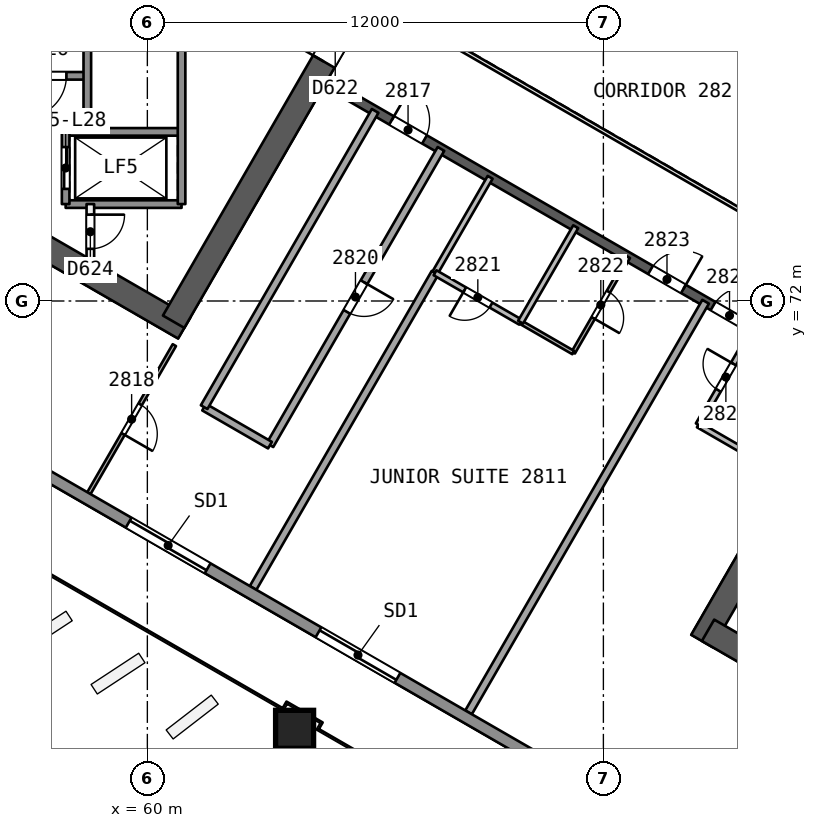
"""IFC4 building model, lengths in metres.
Left out: names, types, materials, properties, quantities, classifications, styles, units other than length and angle.
Written with IfcOpenShell. Run it as: python <this file> out.ifc"""

import sys

from ifc_helpers import new_model, si_unit, direction, frame, frame_2d, origin, origin_2d, place, context, subcontext, project, spatial, rectangle, extrude, element, fill, save


model = new_model("IFC4")
c1 = context("Model", 3, precision=1e-05, world=origin(), true_north=direction((0.0, 1.0)))
c2 = subcontext(c1, "Body", "Model", "MODEL_VIEW")
j1 = project(units=[si_unit("LENGTHUNIT", "METRE"), si_unit("PLANEANGLEUNIT", "RADIAN")], contexts=[c1])
p1 = place(None, origin())
s1 = spatial("IfcSite", under=j1, at=p1, CompositionType="ELEMENT")
p2 = place(p1, origin())
s2 = spatial("IfcBuilding", under=s1, at=p2, CompositionType="ELEMENT")
p3 = place(p2, frame((0.0, 0.0, 117.9)))
s3 = spatial("IfcBuildingStorey", under=s2, at=p3, CompositionType="ELEMENT", Elevation=117.9)
p4 = place(p3, frame((48.722, 78.365, 0.0), z_axis=(0.0, 0.0, 1.0), x_axis=(0.866020036431, -0.500009296414, 0.0)))
e1 = element("IfcWall", 1, at=p4, inside=s3, PredefinedType="SHEAR", context=c2, shape_type="SweptSolid", body=[
    extrude(rectangle(XDim=14.146, YDim=0.65, at=frame_2d((7.073, 0.0))), origin(), (0.0, 0.0, 1.0), 3.7),
])
p5 = place(p3, frame((60.691, 71.455, 0.0), z_axis=(0.0, 0.0, 1.0), x_axis=(0.499983075189, 0.866035175108, 0.0)))
e2 = element("IfcWall", 2, at=p5, inside=s3, PredefinedType="SHEAR", context=c2, shape_type="SweptSolid", body=[
    extrude(rectangle(XDim=10.055, YDim=0.65, at=frame_2d((5.027, 0.0))), origin(), (0.0, 0.0, 1.0), 3.7),
])
p6 = place(p5, frame((7.905, 0.0, 0.0)))
e3 = element("IfcOpeningElement", 3, at=p6, cuts=e2, PredefinedType="OPENING", context=c2, shape_type="SweptSolid", body=[
    extrude(rectangle(XDim=1.2, YDim=2.1, at=frame_2d((0.6, 1.05))), frame((0.0, 0.335, 0.0), z_axis=(0.0, -1.0, 0.0), x_axis=(1.0, 0.0, 0.0)), (0.0, 0.0, 1.0), 0.671),
])
p7 = place(p3, frame((79.688, 71.881, 0.0), z_axis=(0.0, 0.0, 1.0), x_axis=(-0.49999822179, -0.866026430432, 0.0)))
e4 = element("IfcWall", 4, at=p7, inside=s3, PredefinedType="SHEAR", context=c2, shape_type="SweptSolid", body=[
    extrude(rectangle(XDim=10.192, YDim=0.65, at=frame_2d((5.096, 0.0))), origin(), (0.0, 0.0, 1.0), 3.7),
])
p8 = place(p7, frame((0.762, 0.0, 0.0)))
e5 = element("IfcOpeningElement", 5, at=p8, cuts=e4, PredefinedType="OPENING", context=c2, shape_type="SweptSolid", body=[
    extrude(rectangle(XDim=1.2, YDim=2.1, at=frame_2d((0.6, 1.05))), frame((0.0, 0.335, 0.0), z_axis=(0.0, -1.0, 0.0), x_axis=(1.0, 0.0, 0.0)), (0.0, 0.0, 1.0), 0.671),
])
p9 = place(p3, frame((74.754, 63.335, 0.0), z_axis=(0.0, 0.0, 1.0), x_axis=(0.866026250715, -0.49999853307, 0.0)))
e6 = element("IfcWall", 6, at=p9, inside=s3, PredefinedType="SHEAR", context=c2, shape_type="SweptSolid", body=[
    extrude(rectangle(XDim=14.008, YDim=0.65, at=frame_2d((7.004, 0.0))), origin(), (0.0, 0.0, 1.0), 3.7),
])
p10 = place(p3, frame((64.7, 77.748, 0.0), z_axis=(0.0, 0.0, 1.0), x_axis=(0.866026492143, -0.499998114903, 0.0)))
e7 = element("IfcWall", 7, at=p10, inside=s3, PredefinedType="SHEAR", context=c2, shape_type="SweptSolid", body=[
    extrude(rectangle(XDim=15.588, YDim=0.25, at=frame_2d((7.794, 0.0))), origin(), (0.0, 0.0, 1.0), 3.25),
])
p11 = place(p10, frame((1.994, 0.0, 0.0)))
e8 = element("IfcOpeningElement", 8, at=p11, cuts=e7, PredefinedType="OPENING", context=c2, shape_type="SweptSolid", body=[
    extrude(rectangle(XDim=1.0, YDim=2.1, at=frame_2d((0.5, 1.05))), frame((0.0, 0.135, 0.0), z_axis=(0.0, -1.0, 0.0), x_axis=(1.0, 0.0, 0.0)), (0.0, 0.0, 1.0), 0.271),
])
p12 = place(p10, frame((9.862, 0.0, 0.0)))
e9 = element("IfcOpeningElement", 9, at=p12, cuts=e7, PredefinedType="OPENING", context=c2, shape_type="SweptSolid", body=[
    extrude(rectangle(XDim=1.0, YDim=2.1, at=frame_2d((0.5, 1.05))), frame((0.0, 0.135, 0.0), z_axis=(0.0, -1.0, 0.0), x_axis=(1.0, 0.0, 0.0)), (0.0, 0.0, 1.0), 0.271),
])
p13 = place(p10, frame((11.762, 0.0, 0.0)))
e10 = element("IfcOpeningElement", 10, at=p13, cuts=e7, PredefinedType="OPENING", context=c2, shape_type="SweptSolid", body=[
    extrude(rectangle(XDim=1.0, YDim=2.1, at=frame_2d((0.5, 1.05))), frame((0.0, 0.135, 0.0), z_axis=(0.0, -1.0, 0.0), x_axis=(1.0, 0.0, 0.0)), (0.0, 0.0, 1.0), 0.271),
])
p14 = place(p3, frame((63.862, 60.709, 0.0), z_axis=(0.010092954999, 0.017481261926, 0.999796248113), x_axis=(-0.866025993948, 0.499998977805, 1.48321e-07)))
e11 = element("IfcColumn", 11, at=p14, inside=s3, PredefinedType="COLUMN", context=c2, shape_type="SweptSolid", body=[
    extrude(rectangle(XDim=1.0, YDim=1.0, at=origin_2d()), origin(), (0.0, 0.0, 1.0), 3.701),
])
p15 = place(p3, frame((60.71, 70.838, 0.0), z_axis=(0.0, 0.0, 1.0), x_axis=(-0.499957405522, -0.866049994321, 0.0)))
e12 = element("IfcWall", 12, at=p15, inside=s3, PredefinedType="PARTITIONING", context=c2, shape_type="SweptSolid", body=[
    extrude(rectangle(XDim=4.498, YDim=0.1, at=frame_2d((2.249, 0.0))), origin(), (0.0, 0.0, 1.0), 3.25),
])
p16 = place(p15, frame((1.799, 0.0, 0.0)))
e13 = element("IfcOpeningElement", 13, at=p16, cuts=e12, PredefinedType="OPENING", context=c2, shape_type="SweptSolid", body=[
    extrude(rectangle(XDim=0.9, YDim=2.1, at=frame_2d((0.45, 1.05))), frame((0.0, 0.061, 0.0), z_axis=(0.0, -1.0, 0.0), x_axis=(1.0, 0.0, 0.0)), (0.0, 0.0, 1.0), 0.121),
])
p17 = place(p3, frame((67.726, 76.001, 0.0), z_axis=(0.0, 0.0, 1.0), x_axis=(-0.5000018851, -0.866024315419, 0.0)))
e14 = element("IfcWall", 14, at=p17, inside=s3, PredefinedType="PARTITIONING", context=c2, shape_type="SweptSolid", body=[
    extrude(rectangle(XDim=9.0, YDim=0.2, at=frame_2d((4.5, 0.0))), origin(), (0.0, 0.0, 1.0), 3.25),
])
p18 = place(p17, frame((4.05, 0.0, 0.0)))
e15 = element("IfcOpeningElement", 15, at=p18, cuts=e14, PredefinedType="OPENING", context=c2, shape_type="SweptSolid", body=[
    extrude(rectangle(XDim=0.9, YDim=2.1, at=frame_2d((0.45, 1.05))), frame((0.0, 0.11, 0.0), z_axis=(0.0, -1.0, 0.0), x_axis=(1.0, 0.0, 0.0)), (0.0, 0.0, 1.0), 0.221),
])
p19 = place(p3, frame((63.226, 68.207, 0.0), z_axis=(0.0, 0.0, 1.0), x_axis=(-0.866041268327, 0.499972520799, 0.0)))
e16 = element("IfcWall", 16, at=p19, inside=s3, PredefinedType="PARTITIONING", context=c2, shape_type="SweptSolid", body=[
    extrude(rectangle(XDim=2.0, YDim=0.2, at=frame_2d((1.0, 0.0))), origin(), (0.0, 0.0, 1.0), 3.25),
])
p20 = place(p3, frame((61.494, 69.207, 0.0), z_axis=(0.0, 0.0, 1.0), x_axis=(0.5000018851, 0.866024315419, 0.0)))
e17 = element("IfcWall", 17, at=p20, inside=s3, PredefinedType="PARTITIONING", context=c2, shape_type="SweptSolid", body=[
    extrude(rectangle(XDim=9.0, YDim=0.2, at=frame_2d((4.5, 0.0))), origin(), (0.0, 0.0, 1.0), 3.25),
])
p21 = place(p3, frame((62.782, 64.449, 0.0), z_axis=(0.0, 0.0, 1.0), x_axis=(0.500007865211, 0.866020862755, 0.0)))
e18 = element("IfcWall", 18, at=p21, inside=s3, PredefinedType="PARTITIONING", context=c2, shape_type="SweptSolid", body=[
    extrude(rectangle(XDim=9.576, YDim=0.2, at=frame_2d((4.788, 0.0))), origin(), (0.0, 0.0, 1.0), 3.25),
])
p22 = place(p3, frame((67.57, 72.743, 0.0), z_axis=(0.0, 0.0, 1.0), x_axis=(0.499987231761, 0.866032775405, 0.0)))
e19 = element("IfcWall", 19, at=p22, inside=s3, PredefinedType="PARTITIONING", context=c2, shape_type="SweptSolid", body=[
    extrude(rectangle(XDim=2.9, YDim=0.15, at=frame_2d((1.45, 0.0))), origin(), (0.0, 0.0, 1.0), 3.25),
])
p23 = place(p3, frame((69.822, 71.443, 0.0), z_axis=(0.0, 0.0, 1.0), x_axis=(-0.866021400173, 0.500006934395, 0.0)))
e20 = element("IfcWall", 20, at=p23, inside=s3, PredefinedType="PARTITIONING", context=c2, shape_type="SweptSolid", body=[
    extrude(rectangle(XDim=2.6, YDim=0.15, at=frame_2d((1.3, 0.0))), origin(), (0.0, 0.0, 1.0), 3.25),
])
p24 = place(p23, frame((0.9, 0.0, 0.0)))
e21 = element("IfcOpeningElement", 21, at=p24, cuts=e20, PredefinedType="OPENING", context=c2, shape_type="SweptSolid", body=[
    extrude(rectangle(XDim=0.8, YDim=2.1, at=frame_2d((0.4, 1.05))), frame((0.0, 0.085, 0.0), z_axis=(0.0, -1.0, 0.0), x_axis=(1.0, 0.0, 0.0)), (0.0, 0.0, 1.0), 0.171),
])
p25 = place(p3, frame((72.657, 73.154, 0.0), z_axis=(0.0, 0.0, 1.0), x_axis=(-0.499987231761, -0.866032775405, 0.0)))
e22 = element("IfcWall", 22, at=p25, inside=s3, PredefinedType="PARTITIONING", context=c2, shape_type="SweptSolid", body=[
    extrude(rectangle(XDim=2.9, YDim=0.1, at=frame_2d((1.45, 0.0))), origin(), (0.0, 0.0, 1.0), 3.25),
])
p26 = place(p25, frame((1.05, 0.0, 0.0)))
e23 = element("IfcOpeningElement", 23, at=p26, cuts=e22, PredefinedType="OPENING", context=c2, shape_type="SweptSolid", body=[
    extrude(rectangle(XDim=0.8, YDim=2.1, at=frame_2d((0.4, 1.05))), frame((0.0, 0.061, 0.0), z_axis=(0.0, -1.0, 0.0), x_axis=(1.0, 0.0, 0.0)), (0.0, 0.0, 1.0), 0.121),
])
p27 = place(p3, frame((71.207, 70.643, 0.0), z_axis=(0.0, 0.0, 1.0), x_axis=(-0.866055983265, 0.499947031044, 0.0)))
e24 = element("IfcWall", 24, at=p27, inside=s3, PredefinedType="PARTITIONING", context=c2, shape_type="SweptSolid", body=[
    extrude(rectangle(XDim=1.6, YDim=0.1, at=frame_2d((0.8, 0.0))), origin(), (0.0, 0.0, 1.0), 3.25),
])
p28 = place(p3, frame((68.452, 61.176, 0.0), z_axis=(0.0, 0.0, 1.0), x_axis=(0.499988393093, 0.866032104932, 0.0)))
e25 = element("IfcWall", 25, at=p28, inside=s3, PredefinedType="PARTITIONING", context=c2, shape_type="SweptSolid", body=[
    extrude(rectangle(XDim=12.476, YDim=0.2, at=frame_2d((6.238, 0.0))), origin(), (0.0, 0.0, 1.0), 3.25),
])
p29 = place(p3, frame((69.822, 71.443, 0.0), z_axis=(0.0, 0.0, 1.0), x_axis=(0.499987231761, 0.866032775405, 0.0)))
e26 = element("IfcWall", 26, at=p29, inside=s3, PredefinedType="PARTITIONING", context=c2, shape_type="SweptSolid", body=[
    extrude(rectangle(XDim=2.9, YDim=0.15, at=frame_2d((1.45, 0.0))), origin(), (0.0, 0.0, 1.0), 3.25),
])
p30 = place(p3, frame((76.578, 67.542, 0.0), z_axis=(0.0, 0.0, 1.0), x_axis=(-0.866038271014, 0.499977712642, 0.0)))
e27 = element("IfcWall", 27, at=p30, inside=s3, PredefinedType="PARTITIONING", context=c2, shape_type="SweptSolid", body=[
    extrude(rectangle(XDim=2.401, YDim=0.15, at=frame_2d((1.2, 0.0))), origin(), (0.0, 0.0, 1.0), 3.25),
])
p31 = place(p3, frame((74.498, 68.743, 0.0), z_axis=(0.0, 0.0, 1.0), x_axis=(0.499987231761, 0.866032775405, 0.0)))
e28 = element("IfcWall", 28, at=p31, inside=s3, PredefinedType="PARTITIONING", context=c2, shape_type="SweptSolid", body=[
    extrude(rectangle(XDim=2.9, YDim=0.15, at=frame_2d((1.45, 0.0))), origin(), (0.0, 0.0, 1.0), 3.25),
])
p32 = place(p31, frame((1.05, 0.0, 0.0)))
e29 = element("IfcOpeningElement", 29, at=p32, cuts=e28, PredefinedType="OPENING", context=c2, shape_type="SweptSolid", body=[
    extrude(rectangle(XDim=0.8, YDim=2.1, at=frame_2d((0.4, 1.05))), frame((0.0, 0.085, 0.0), z_axis=(0.0, -1.0, 0.0), x_axis=(1.0, 0.0, 0.0)), (0.0, 0.0, 1.0), 0.171),
])
p33 = place(p3, frame((89.699, 48.737, 0.0), z_axis=(0.0, 0.0, 1.0), x_axis=(-0.866023671094, 0.500003001095, 0.0)))
e30 = element("IfcWall", 30, at=p33, inside=s3, PredefinedType="SOLIDWALL", context=c2, shape_type="SweptSolid", body=[
    extrude(rectangle(XDim=56.723, YDim=0.3, at=frame_2d((28.361, 0.0))), origin(), (0.0, 0.0, 1.0), 3.25),
])
p34 = place(p33, frame((32.461, 0.0, 0.0)))
e31 = element("IfcOpeningElement", 31, at=p34, cuts=e30, PredefinedType="OPENING", context=c2, shape_type="SweptSolid", body=[
    extrude(rectangle(XDim=2.4, YDim=2.4, at=frame_2d((1.2, 1.2))), frame((0.0, 0.161, 0.0), z_axis=(0.0, -1.0, 0.0), x_axis=(1.0, 0.0, 0.0)), (0.0, 0.0, 1.0), 0.321),
])
p35 = place(p33, frame((44.039, 0.0, 0.0)))
e32 = element("IfcOpeningElement", 32, at=p35, cuts=e30, PredefinedType="OPENING", context=c2, shape_type="SweptSolid", body=[
    extrude(rectangle(XDim=2.4, YDim=2.4, at=frame_2d((1.2, 1.2))), frame((0.0, 0.161, 0.0), z_axis=(0.0, -1.0, 0.0), x_axis=(1.0, 0.0, 0.0)), (0.0, 0.0, 1.0), 0.321),
])
p36 = place(p33, frame((11.067, 0.0, 0.0)))
e33 = element("IfcOpeningElement", 33, at=p36, cuts=e30, PredefinedType="OPENING", context=c2, shape_type="SweptSolid", body=[
    extrude(rectangle(XDim=2.4, YDim=2.4, at=frame_2d((1.2, 1.2))), frame((0.0, 0.161, 0.0), z_axis=(0.0, -1.0, 0.0), x_axis=(1.0, 0.0, 0.0)), (0.0, 0.0, 1.0), 0.321),
])
p37 = place(p33, frame((26.694, 0.0, 0.0)))
e34 = element("IfcOpeningElement", 34, at=p37, cuts=e30, PredefinedType="OPENING", context=c2, shape_type="SweptSolid", body=[
    extrude(rectangle(XDim=2.4, YDim=2.4, at=frame_2d((1.2, 1.2))), frame((0.0, 0.161, 0.0), z_axis=(0.0, -1.0, 0.0), x_axis=(1.0, 0.0, 0.0)), (0.0, 0.0, 1.0), 0.321),
])
p38 = place(p3, frame((58.42, 77.925, 0.0), z_axis=(0.0, 0.0, 1.0), x_axis=(-1.0, 0.0, 0.0)))
e35 = element("IfcWall", 35, at=p38, inside=s3, PredefinedType="SOLIDWALL", context=c2, shape_type="SweptSolid", body=[
    extrude(rectangle(XDim=7.7, YDim=0.2, at=frame_2d((3.85, 0.0))), origin(), (0.0, 0.0, 1.0), 3.25),
])
p39 = place(p38, frame((0.55, 0.0, 0.0)))
e36 = element("IfcOpeningElement", 36, at=p39, cuts=e35, PredefinedType="OPENING", context=c2, shape_type="SweptSolid", body=[
    extrude(rectangle(XDim=1.1, YDim=2.1, at=frame_2d((0.55, 1.05))), frame((0.0, 0.11, 0.0), z_axis=(0.0, -1.0, 0.0), x_axis=(1.0, 0.0, 0.0)), (0.0, 0.0, 1.0), 0.221),
])
for number, where, z_axis, x_axis in (
    (37, (60.9, 76.45, 0.0), (0.0, 0.0, 1.0), (-1.0, 0.0, 0.0)),
    (38, (60.9, 74.55, 0.0), (0.0, 0.0, 1.0), (-1.0, 0.0, 0.0)),
):
    element("IfcWall", number, at=place(p3, frame(where, z_axis=z_axis, x_axis=x_axis)), inside=s3, PredefinedType="SOLIDWALL", context=c2, shape_type="SweptSolid", body=[
        extrude(rectangle(XDim=3.05, YDim=0.2, at=frame_2d((1.525, 0.0))), origin(), (0.0, 0.0, 1.0), 3.25),
    ])
p40 = place(p3, frame((60.9, 85.45, 0.0), z_axis=(0.0, 0.0, 1.0), x_axis=(0.0, -1.0, 0.0)))
e39 = element("IfcWall", 39, at=p40, inside=s3, PredefinedType="SOLIDWALL", context=c2, shape_type="SweptSolid", body=[
    extrude(rectangle(XDim=10.9, YDim=0.2, at=frame_2d((5.45, 0.0))), origin(), (0.0, 0.0, 1.0), 3.25),
])
p41 = place(p40, frame((4.0, 0.0, 0.0)))
e40 = element("IfcOpeningElement", 40, at=p41, cuts=e39, PredefinedType="OPENING", context=c2, shape_type="SweptSolid", body=[
    extrude(rectangle(XDim=1.0, YDim=2.1, at=frame_2d((0.5, 1.05))), frame((0.0, 0.11, 0.0), z_axis=(0.0, -1.0, 0.0), x_axis=(1.0, 0.0, 0.0)), (0.0, 0.0, 1.0), 0.221),
])
p42 = place(p3, frame((58.5, 74.55, 0.0), z_axis=(0.0, 0.0, 1.0), x_axis=(0.0, -1.0, 0.0)))
e41 = element("IfcWall", 41, at=p42, inside=s3, PredefinedType="PARTITIONING", context=c2, shape_type="SweptSolid", body=[
    extrude(rectangle(XDim=1.455, YDim=0.2, at=frame_2d((0.728, 0.0))), origin(), (0.0, 0.0, 1.0), 3.25),
])
p43 = place(p42, frame((0.278, 0.0, 0.0)))
e42 = element("IfcOpeningElement", 42, at=p43, cuts=e41, PredefinedType="OPENING", context=c2, shape_type="SweptSolid", body=[
    extrude(rectangle(XDim=0.9, YDim=2.1, at=frame_2d((0.45, 1.05))), frame((0.0, 0.11, 0.0), z_axis=(0.0, -1.0, 0.0), x_axis=(1.0, 0.0, 0.0)), (0.0, 0.0, 1.0), 0.221),
])
p44 = place(p3, frame((58.42, 85.45, 0.0), z_axis=(0.0, 0.0, 1.0), x_axis=(0.0, -1.0, 0.0)))
e43 = element("IfcWall", 43, at=p44, inside=s3, PredefinedType="SOLIDWALL", context=c2, shape_type="SweptSolid", body=[
    extrude(rectangle(XDim=9.0, YDim=0.2, at=frame_2d((4.5, 0.0))), origin(), (0.0, 0.0, 1.0), 3.25),
])
p45 = place(p3, frame((57.85, 76.45, 0.0), z_axis=(0.0, 0.0, 1.0), x_axis=(0.0, -1.0, 0.0)))
e44 = element("IfcWall", 44, at=p45, inside=s3, PredefinedType="SOLIDWALL", context=c2, shape_type="SweptSolid", body=[
    extrude(rectangle(XDim=1.9, YDim=0.2, at=frame_2d((0.95, 0.0))), origin(), (0.0, 0.0, 1.0), 3.25),
])
p46 = place(p45, frame((0.4, 0.0, 0.0)))
e45 = element("IfcOpeningElement", 45, at=p46, cuts=e44, PredefinedType="OPENING", context=c2, shape_type="SweptSolid", body=[
    extrude(rectangle(XDim=1.1, YDim=2.1, at=frame_2d((0.55, 1.05))), frame((0.0, 0.11, 0.0), z_axis=(0.0, -1.0, 0.0), x_axis=(1.0, 0.0, 0.0)), (0.0, 0.0, 1.0), 0.221),
])
p47 = place(p3, frame((67.702, 78.948, 0.0), z_axis=(0.0, 0.0, 1.0), x_axis=(0.866026658274, -0.499997827154, 0.0)))
e46 = element("IfcWall", 46, at=p47, inside=s3, PredefinedType="PARTITIONING", context=c2, shape_type="SweptSolid", body=[
    extrude(rectangle(XDim=11.588, YDim=0.1, at=frame_2d((5.794, 0.0))), origin(), (0.0, 0.0, 1.0), 3.25),
])
p48 = place(p11, origin())
e47 = element("IfcDoor", 47, at=p48, inside=s3, OperationType="SINGLE_SWING_LEFT", PredefinedType="NOTDEFINED", context=c2, shape_type="SweptSolid", body=[
    extrude(rectangle(XDim=1.0, YDim=2.1, at=frame_2d((0.5, 1.05))), frame((0.0, 0.025, 0.0), z_axis=(0.0, -1.0, 0.0), x_axis=(1.0, 0.0, 0.0)), (0.0, 0.0, 1.0), 0.05),
])
fill(e8, e47)
p49 = place(p16, origin())
e48 = element("IfcDoor", 48, at=p49, inside=s3, OperationType="SINGLE_SWING_RIGHT", PredefinedType="NOTDEFINED", context=c2, shape_type="SweptSolid", body=[
    extrude(rectangle(XDim=0.9, YDim=2.1, at=frame_2d((0.45, 1.05))), frame((0.0, 0.025, 0.0), z_axis=(0.0, -1.0, 0.0), x_axis=(1.0, 0.0, 0.0)), (0.0, 0.0, 1.0), 0.05),
])
fill(e13, e48)
p50 = place(p18, origin())
e49 = element("IfcDoor", 49, at=p50, inside=s3, OperationType="SINGLE_SWING_LEFT", PredefinedType="NOTDEFINED", context=c2, shape_type="SweptSolid", body=[
    extrude(rectangle(XDim=0.9, YDim=2.1, at=frame_2d((0.45, 1.05))), frame((0.0, 0.025, 0.0), z_axis=(0.0, -1.0, 0.0), x_axis=(1.0, 0.0, 0.0)), (0.0, 0.0, 1.0), 0.05),
])
fill(e15, e49)
p51 = place(p24, origin())
e50 = element("IfcDoor", 50, at=p51, inside=s3, OperationType="SINGLE_SWING_RIGHT", PredefinedType="NOTDEFINED", context=c2, shape_type="SweptSolid", body=[
    extrude(rectangle(XDim=0.8, YDim=2.1, at=frame_2d((0.4, 1.05))), frame((0.0, 0.025, 0.0), z_axis=(0.0, -1.0, 0.0), x_axis=(1.0, 0.0, 0.0)), (0.0, 0.0, 1.0), 0.05),
])
fill(e21, e50)
p52 = place(p26, origin())
e51 = element("IfcDoor", 51, at=p52, inside=s3, OperationType="SINGLE_SWING_RIGHT", PredefinedType="NOTDEFINED", context=c2, shape_type="SweptSolid", body=[
    extrude(rectangle(XDim=0.8, YDim=2.1, at=frame_2d((0.4, 1.05))), frame((0.0, 0.025, 0.0), z_axis=(0.0, -1.0, 0.0), x_axis=(1.0, 0.0, 0.0)), (0.0, 0.0, 1.0), 0.05),
])
fill(e23, e51)
p53 = place(p12, origin())
e52 = element("IfcDoor", 52, at=p53, inside=s3, OperationType="SINGLE_SWING_RIGHT", PredefinedType="NOTDEFINED", context=c2, shape_type="SweptSolid", body=[
    extrude(rectangle(XDim=1.0, YDim=2.1, at=frame_2d((0.5, 1.05))), frame((0.0, 0.025, 0.0), z_axis=(0.0, -1.0, 0.0), x_axis=(1.0, 0.0, 0.0)), (0.0, 0.0, 1.0), 0.05),
])
fill(e9, e52)
p54 = place(p32, origin())
e53 = element("IfcDoor", 53, at=p54, inside=s3, OperationType="SINGLE_SWING_RIGHT", PredefinedType="NOTDEFINED", context=c2, shape_type="SweptSolid", body=[
    extrude(rectangle(XDim=0.8, YDim=2.1, at=frame_2d((0.4, 1.05))), frame((0.0, 0.025, 0.0), z_axis=(0.0, -1.0, 0.0), x_axis=(1.0, 0.0, 0.0)), (0.0, 0.0, 1.0), 0.05),
])
fill(e29, e53)
p55 = place(p13, origin())
e54 = element("IfcDoor", 54, at=p55, inside=s3, OperationType="SINGLE_SWING_RIGHT", PredefinedType="NOTDEFINED", context=c2, shape_type="SweptSolid", body=[
    extrude(rectangle(XDim=1.0, YDim=2.1, at=frame_2d((0.5, 1.05))), frame((0.0, 0.025, 0.0), z_axis=(0.0, -1.0, 0.0), x_axis=(1.0, 0.0, 0.0)), (0.0, 0.0, 1.0), 0.05),
])
fill(e10, e54)
p56 = place(p34, origin())
e55 = element("IfcDoor", 55, at=p56, inside=s3, OperationType="SLIDING_TO_LEFT", PredefinedType="NOTDEFINED", context=c2, shape_type="SweptSolid", body=[
    extrude(rectangle(XDim=2.4, YDim=2.4, at=frame_2d((1.2, 1.2))), frame((0.0, 0.025, 0.0), z_axis=(0.0, -1.0, 0.0), x_axis=(1.0, 0.0, 0.0)), (0.0, 0.0, 1.0), 0.05),
])
fill(e31, e55)
p57 = place(p37, origin())
e56 = element("IfcDoor", 56, at=p57, inside=s3, OperationType="SLIDING_TO_RIGHT", PredefinedType="NOTDEFINED", context=c2, shape_type="SweptSolid", body=[
    extrude(rectangle(XDim=2.4, YDim=2.4, at=frame_2d((1.2, 1.2))), frame((0.0, 0.025, 0.0), z_axis=(0.0, -1.0, 0.0), x_axis=(1.0, 0.0, 0.0)), (0.0, 0.0, 1.0), 0.05),
])
fill(e34, e56)
p58 = place(p6, origin())
e57 = element("IfcDoor", 57, at=p58, inside=s3, OperationType="SINGLE_SWING_LEFT", PredefinedType="NOTDEFINED", context=c2, shape_type="SweptSolid", body=[
    extrude(rectangle(XDim=1.2, YDim=2.1, at=frame_2d((0.6, 1.05))), frame((0.0, 0.025, 0.0), z_axis=(0.0, -1.0, 0.0), x_axis=(1.0, 0.0, 0.0)), (0.0, 0.0, 1.0), 0.05),
])
fill(e3, e57)
p59 = place(p46, origin())
e58 = element("IfcDoor", 58, at=p59, inside=s3, OperationType="SLIDING_TO_RIGHT", PredefinedType="NOTDEFINED", context=c2, shape_type="SweptSolid", body=[
    extrude(rectangle(XDim=1.1, YDim=2.1, at=frame_2d((0.55, 1.05))), frame((0.0, 0.025, 0.0), z_axis=(0.0, -1.0, 0.0), x_axis=(1.0, 0.0, 0.0)), (0.0, 0.0, 1.0), 0.05),
])
fill(e45, e58)
p60 = place(p43, origin())
e59 = element("IfcDoor", 59, at=p60, inside=s3, OperationType="SINGLE_SWING_LEFT", PredefinedType="NOTDEFINED", context=c2, shape_type="SweptSolid", body=[
    extrude(rectangle(XDim=0.9, YDim=2.1, at=frame_2d((0.45, 1.05))), frame((0.0, 0.025, 0.0), z_axis=(0.0, -1.0, 0.0), x_axis=(1.0, 0.0, 0.0)), (0.0, 0.0, 1.0), 0.05),
])
fill(e42, e59)
p61 = place(p39, origin())
e60 = element("IfcDoor", 60, at=p61, inside=s3, OperationType="SINGLE_SWING_RIGHT", PredefinedType="NOTDEFINED", context=c2, shape_type="SweptSolid", body=[
    extrude(rectangle(XDim=1.1, YDim=2.1, at=frame_2d((0.55, 1.05))), frame((0.0, 0.025, 0.0), z_axis=(0.0, -1.0, 0.0), x_axis=(1.0, 0.0, 0.0)), (0.0, 0.0, 1.0), 0.05),
])
fill(e36, e60)
save(model, sys.argv[1])
